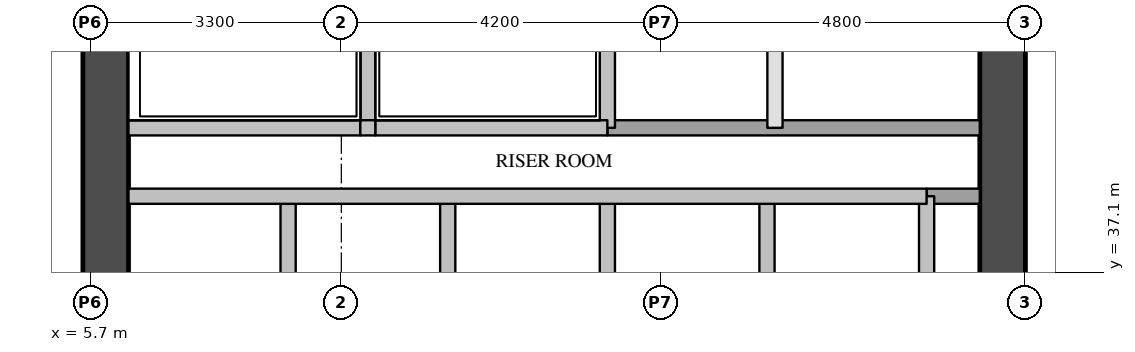
"""IFC4 building model, lengths in metres.
Left out: names, types, materials, properties, quantities, classifications, styles, units other than length and angle.
Written with IfcOpenShell. Run it as: python <this file> out.ifc"""

import sys

from ifc_helpers import new_model, si_unit, direction, frame, frame_2d, origin, place, context, subcontext, project, spatial, rectangle, extrude, element, save


model = new_model("IFC4")
c1 = context("Model", 3, precision=1e-05, world=origin(), true_north=direction((0.0, 1.0)))
c2 = subcontext(c1, "Body", "Model", "MODEL_VIEW")
j1 = project(units=[si_unit("LENGTHUNIT", "METRE"), si_unit("PLANEANGLEUNIT", "RADIAN")], contexts=[c1])
p1 = place(None, origin())
s1 = spatial("IfcSite", under=j1, at=p1, CompositionType="ELEMENT")
p2 = place(p1, origin())
s2 = spatial("IfcBuilding", under=s1, at=p2, CompositionType="ELEMENT")
p3 = place(p2, frame((0.0, 0.0, -6.0)))
s3 = spatial("IfcBuildingStorey", under=s2, at=p3, CompositionType="ELEMENT", Elevation=-6.0)
p4 = place(p3, frame((5.9, 29.1, 0.0), z_axis=(0.0, 0.0, 1.0), x_axis=(0.0, 1.0, 0.0)))
e1 = element("IfcWall", 1, at=p4, inside=s3, PredefinedType="SHEAR", context=c2, shape_type="SweptSolid", body=[
    extrude(rectangle(XDim=20.3, YDim=0.6, at=frame_2d((10.15, 0.0))), origin(), (0.0, 0.0, 1.0), 5.59),
])
p5 = place(p4, frame((16.4, 0.0, 0.0)))
e2 = element("IfcOpeningElement", 2, at=p5, cuts=e1, PredefinedType="OPENING", context=c2, shape_type="SweptSolid", body=[
    extrude(rectangle(XDim=1.0, YDim=2.1, at=frame_2d((0.5, 1.05))), frame((0.0, 0.31, 0.0), z_axis=(0.0, -1.0, 0.0), x_axis=(1.0, 0.0, 0.0)), (0.0, 0.0, 1.0), 0.62),
])
p6 = place(p3, frame((17.7, 29.1, 0.0), z_axis=(0.0, 0.0, 1.0), x_axis=(0.0, 1.0, 0.0)))
e3 = element("IfcWall", 3, at=p6, inside=s3, PredefinedType="SHEAR", context=c2, shape_type="SweptSolid", body=[
    extrude(rectangle(XDim=20.3, YDim=0.6, at=frame_2d((10.15, 0.0))), origin(), (0.0, 0.0, 1.0), 5.59),
])
p7 = place(p6, frame((1.25, 0.0, 0.0)))
e4 = element("IfcOpeningElement", 4, at=p7, cuts=e3, PredefinedType="OPENING", context=c2, shape_type="SweptSolid", body=[
    extrude(rectangle(XDim=0.7, YDim=2.1, at=frame_2d((0.35, 1.05))), frame((0.0, 0.31, 0.0), z_axis=(0.0, -1.0, 0.0), x_axis=(1.0, 0.0, 0.0)), (0.0, 0.0, 1.0), 0.62),
])
p8 = place(p6, frame((7.05, 0.0, 0.0)))
e5 = element("IfcOpeningElement", 5, at=p8, cuts=e3, PredefinedType="OPENING", context=c2, shape_type="SweptSolid", body=[
    extrude(rectangle(XDim=0.7, YDim=2.1, at=frame_2d((0.35, 1.05))), frame((0.0, 0.31, 0.0), z_axis=(0.0, -1.0, 0.0), x_axis=(1.0, 0.0, 0.0)), (0.0, 0.0, 1.0), 0.62),
])
p9 = place(p6, frame((3.6, 0.0, 0.0)))
e6 = element("IfcOpeningElement", 6, at=p9, cuts=e3, PredefinedType="OPENING", context=c2, shape_type="SweptSolid", body=[
    extrude(rectangle(XDim=1.8, YDim=2.1, at=frame_2d((0.9, 1.05))), frame((0.0, 0.31, 0.0), z_axis=(0.0, -1.0, 0.0), x_axis=(1.0, 0.0, 0.0)), (0.0, 0.0, 1.0), 0.62),
])
p10 = place(p6, frame((16.4, 0.0, 0.0)))
e7 = element("IfcOpeningElement", 7, at=p10, cuts=e3, PredefinedType="OPENING", context=c2, shape_type="SweptSolid", body=[
    extrude(rectangle(XDim=1.0, YDim=2.1, at=frame_2d((0.5, 1.05))), frame((0.0, 0.31, 0.0), z_axis=(0.0, -1.0, 0.0), x_axis=(1.0, 0.0, 0.0)), (0.0, 0.0, 1.0), 0.62),
])
p11 = place(p3, frame((8.3, 34.9, 0.0), z_axis=(0.0, 0.0, 1.0), x_axis=(0.0, 1.0, 0.0)))
e8 = element("IfcWall", 8, at=p11, inside=s3, PredefinedType="SOLIDWALL", context=c2, shape_type="SweptSolid", body=[
    extrude(rectangle(XDim=3.2, YDim=0.2, at=frame_2d((1.6, 0.0))), origin(), (0.0, 0.0, 1.0), 5.59),
])
p12 = place(p3, frame((9.35, 39.0, 0.0), z_axis=(0.0, 0.0, 1.0), x_axis=(0.0, 1.0, 0.0)))
e9 = element("IfcWall", 9, at=p12, inside=s3, PredefinedType="SOLIDWALL", context=c2, shape_type="SweptSolid", body=[
    extrude(rectangle(XDim=2.38, YDim=0.2, at=frame_2d((1.19, 0.0))), origin(), (0.0, 0.0, 1.0), 5.59),
])
for number, where, z_axis, x_axis in (
    (10, (10.4, 34.9, 0.0), (0.0, 0.0, 1.0), (0.0, 1.0, 0.0)),
    (11, (12.5, 34.9, 0.0), (0.0, 0.0, 1.0), (0.0, 1.0, 0.0)),
):
    element("IfcWall", number, at=place(p3, frame(where, z_axis=z_axis, x_axis=x_axis)), inside=s3, PredefinedType="SOLIDWALL", context=c2, shape_type="SweptSolid", body=[
        extrude(rectangle(XDim=3.2, YDim=0.2, at=frame_2d((1.6, 0.0))), origin(), (0.0, 0.0, 1.0), 5.59),
    ])
p13 = place(p3, frame((12.5, 39.0, 0.0), z_axis=(0.0, 0.0, 1.0), x_axis=(0.0, 1.0, 0.0)))
e12 = element("IfcWall", 12, at=p13, inside=s3, PredefinedType="SOLIDWALL", context=c2, shape_type="SweptSolid", body=[
    extrude(rectangle(XDim=2.38, YDim=0.2, at=frame_2d((1.19, 0.0))), origin(), (0.0, 0.0, 1.0), 5.59),
])
p14 = place(p3, frame((14.6, 34.9, 0.0), z_axis=(0.0, 0.0, 1.0), x_axis=(0.0, 1.0, 0.0)))
e13 = element("IfcWall", 13, at=p14, inside=s3, PredefinedType="SOLIDWALL", context=c2, shape_type="SweptSolid", body=[
    extrude(rectangle(XDim=3.2, YDim=0.2, at=frame_2d((1.6, 0.0))), origin(), (0.0, 0.0, 1.0), 5.59),
])
p15 = place(p3, frame((14.705, 39.0, 0.0), z_axis=(0.0, 0.0, 1.0), x_axis=(0.0, 1.0, 0.0)))
e14 = element("IfcWall", 14, at=p15, inside=s3, PredefinedType="PARTITIONING", context=c2, shape_type="SweptSolid", body=[
    extrude(rectangle(XDim=6.2, YDim=0.2, at=frame_2d((3.1, 0.0))), origin(), (0.0, 0.0, 1.0), 5.59),
])
p16 = place(p3, frame((16.7, 34.9, 0.0), z_axis=(0.0, 0.0, 1.0), x_axis=(0.0, 1.0, 0.0)))
e15 = element("IfcWall", 15, at=p16, inside=s3, PredefinedType="SOLIDWALL", context=c2, shape_type="SweptSolid", body=[
    extrude(rectangle(XDim=3.2, YDim=0.2, at=frame_2d((1.6, 0.0))), origin(), (0.0, 0.0, 1.0), 5.59),
])
p17 = place(p3, frame((6.2, 38.1, 0.0), z_axis=(0.0, 0.0, 1.0), x_axis=(1.0, 0.0, 0.0)))
e16 = element("IfcWall", 16, at=p17, inside=s3, PredefinedType="SOLIDWALL", context=c2, shape_type="SweptSolid", body=[
    extrude(rectangle(XDim=10.5, YDim=0.2, at=frame_2d((5.25, 0.0))), origin(), (0.0, 0.0, 1.0), 5.59),
])
p18 = place(p3, frame((16.7, 38.1, 0.0), z_axis=(0.0, 0.0, 1.0), x_axis=(1.0, 0.0, 0.0)))
e17 = element("IfcWall", 17, at=p18, inside=s3, PredefinedType="SOLIDWALL", context=c2, shape_type="SweptSolid", body=[
    extrude(rectangle(XDim=0.7, YDim=0.2, at=frame_2d((0.35, 0.0))), origin(), (0.0, 0.0, 1.0), 5.59),
])
p19 = place(p3, frame((12.5, 39.0, 0.0), z_axis=(0.0, 0.0, 1.0), x_axis=(1.0, 0.0, 0.0)))
e18 = element("IfcWall", 18, at=p19, inside=s3, PredefinedType="SOLIDWALL", context=c2, shape_type="SweptSolid", body=[
    extrude(rectangle(XDim=4.9, YDim=0.2, at=frame_2d((2.45, 0.0))), origin(), (0.0, 0.0, 1.0), 5.59),
])
p20 = place(p3, frame((6.2, 39.0, 0.0), z_axis=(0.0, 0.0, 1.0), x_axis=(1.0, 0.0, 0.0)))
e19 = element("IfcWall", 19, at=p20, inside=s3, PredefinedType="SOLIDWALL", context=c2, shape_type="SweptSolid", body=[
    extrude(rectangle(XDim=3.05, YDim=0.2, at=frame_2d((1.525, 0.0))), origin(), (0.0, 0.0, 1.0), 5.59),
])
p21 = place(p3, frame((9.25, 39.0, 0.0), z_axis=(0.0, 0.0, 1.0), x_axis=(1.0, 0.0, 0.0)))
e20 = element("IfcWall", 20, at=p21, inside=s3, PredefinedType="SOLIDWALL", context=c2, shape_type="SweptSolid", body=[
    extrude(rectangle(XDim=0.2, YDim=0.2, at=frame_2d((0.1, 0.0))), origin(), (0.0, 0.0, 1.0), 5.59),
])
p22 = place(p3, frame((9.45, 39.0, 0.0), z_axis=(0.0, 0.0, 1.0), x_axis=(1.0, 0.0, 0.0)))
e21 = element("IfcWall", 21, at=p22, inside=s3, PredefinedType="SOLIDWALL", context=c2, shape_type="SweptSolid", body=[
    extrude(rectangle(XDim=3.05, YDim=0.2, at=frame_2d((1.525, 0.0))), origin(), (0.0, 0.0, 1.0), 5.59),
])
save(model, sys.argv[1])
